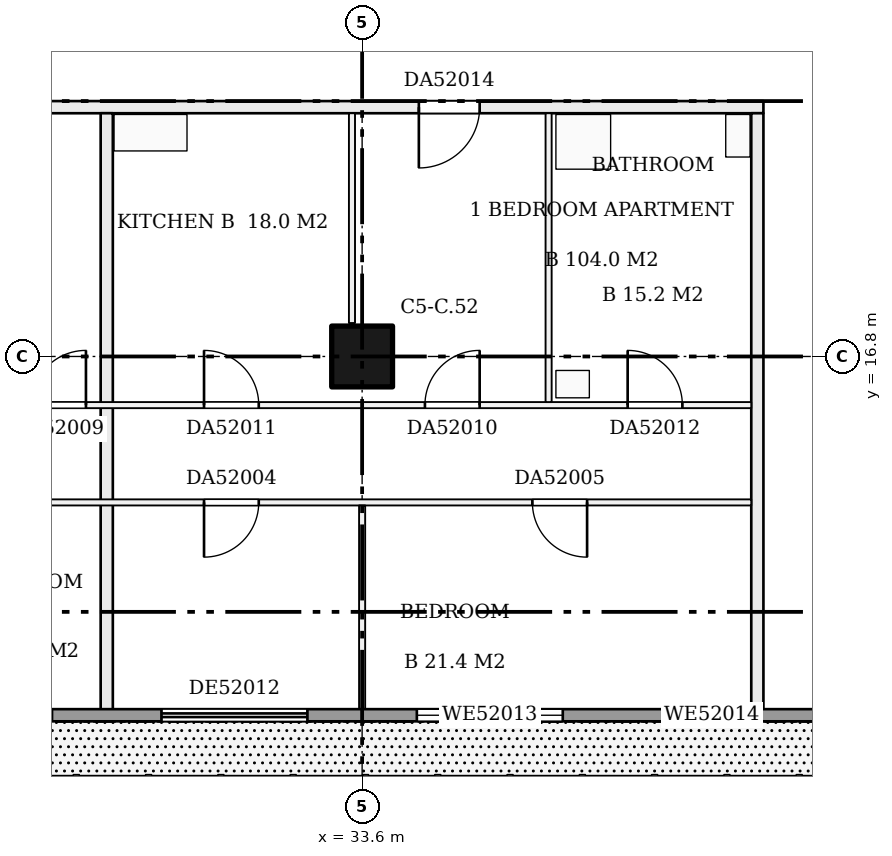
"""IFC4 building model, lengths in metres.
Left out: names, types, materials, properties, quantities, classifications, styles, units other than length and angle.
Written with IfcOpenShell. Run it as: python <this file> out.ifc"""

import sys

from ifc_helpers import new_model, si_unit, direction, frame, frame_2d, origin, origin_2d, place, context, subcontext, project, spatial, rectangle, extrude, element, fill, save


model = new_model("IFC4")
c1 = context("Model", 3, precision=1e-05, world=origin(), true_north=direction((0.0, 1.0)))
c2 = subcontext(c1, "Body", "Model", "MODEL_VIEW")
j1 = project(units=[si_unit("LENGTHUNIT", "METRE"), si_unit("PLANEANGLEUNIT", "RADIAN")], contexts=[c1])
p1 = place(None, origin())
s1 = spatial("IfcSite", under=j1, at=p1, CompositionType="ELEMENT")
p2 = place(p1, origin())
s2 = spatial("IfcBuilding", under=s1, at=p2, CompositionType="ELEMENT")
p3 = place(p2, frame((0.0, 0.0, 200.2)))
s3 = spatial("IfcBuildingStorey", under=s2, at=p3, CompositionType="ELEMENT", Elevation=200.2)
p4 = place(p3, frame((33.6, 16.8, 0.0), z_axis=(0.0, 0.0, 1.0), x_axis=(1.0, 0.0, 0.0)))
e1 = element("IfcColumn", 1, at=p4, inside=s3, PredefinedType="COLUMN", context=c2, shape_type="SweptSolid", body=[
    extrude(rectangle(XDim=1.0, YDim=1.0, at=origin_2d()), origin(), (0.0, 0.0, 1.0), 3.22),
])
p5 = place(p3, frame((21.1, 14.4, 0.0), z_axis=(0.0, 0.0, 1.0), x_axis=(1.0, 0.0, 0.0)))
e2 = element("IfcWall", 2, at=p5, inside=s3, PredefinedType="PARTITIONING", context=c2, shape_type="SweptSolid", body=[
    extrude(rectangle(XDim=18.9, YDim=0.1, at=frame_2d((9.45, 0.0))), origin(), (0.0, 0.0, 1.0), 3.22),
])
p6 = place(p5, frame((1.6, 0.0, 0.0)))
e3 = element("IfcOpeningElement", 3, at=p6, cuts=e2, PredefinedType="OPENING", context=c2, shape_type="SweptSolid", body=[
    extrude(rectangle(XDim=0.9, YDim=2.1, at=frame_2d((0.45, 1.05))), frame((0.0, 0.06, 0.0), z_axis=(0.0, -1.0, 0.0), x_axis=(1.0, 0.0, 0.0)), (0.0, 0.0, 1.0), 0.12),
])
p7 = place(p5, frame((5.7, 0.0, 0.0)))
e4 = element("IfcOpeningElement", 4, at=p7, cuts=e2, PredefinedType="OPENING", context=c2, shape_type="SweptSolid", body=[
    extrude(rectangle(XDim=0.9, YDim=2.1, at=frame_2d((0.45, 1.05))), frame((0.0, 0.06, 0.0), z_axis=(0.0, -1.0, 0.0), x_axis=(1.0, 0.0, 0.0)), (0.0, 0.0, 1.0), 0.12),
])
p8 = place(p5, frame((9.9, 0.0, 0.0)))
e5 = element("IfcOpeningElement", 5, at=p8, cuts=e2, PredefinedType="OPENING", context=c2, shape_type="SweptSolid", body=[
    extrude(rectangle(XDim=0.9, YDim=2.1, at=frame_2d((0.45, 1.05))), frame((0.0, 0.06, 0.0), z_axis=(0.0, -1.0, 0.0), x_axis=(1.0, 0.0, 0.0)), (0.0, 0.0, 1.0), 0.12),
])
p9 = place(p5, frame((15.3, 0.0, 0.0)))
e6 = element("IfcOpeningElement", 6, at=p9, cuts=e2, PredefinedType="OPENING", context=c2, shape_type="SweptSolid", body=[
    extrude(rectangle(XDim=0.9, YDim=2.1, at=frame_2d((0.45, 1.05))), frame((0.0, 0.06, 0.0), z_axis=(0.0, -1.0, 0.0), x_axis=(1.0, 0.0, 0.0)), (0.0, 0.0, 1.0), 0.12),
])
p10 = place(p3, frame((21.1, 16.0, 0.0), z_axis=(0.0, 0.0, 1.0), x_axis=(1.0, 0.0, 0.0)))
e7 = element("IfcWall", 7, at=p10, inside=s3, PredefinedType="PARTITIONING", context=c2, shape_type="SweptSolid", body=[
    extrude(rectangle(XDim=18.9, YDim=0.1, at=frame_2d((9.45, 0.0))), origin(), (0.0, 0.0, 1.0), 3.22),
])
p11 = place(p10, frame((5.274, 0.0, 0.0)))
e8 = element("IfcOpeningElement", 8, at=p11, cuts=e7, PredefinedType="OPENING", context=c2, shape_type="SweptSolid", body=[
    extrude(rectangle(XDim=0.9, YDim=2.1, at=frame_2d((0.45, 1.05))), frame((0.0, 0.06, 0.0), z_axis=(0.0, -1.0, 0.0), x_axis=(1.0, 0.0, 0.0)), (0.0, 0.0, 1.0), 0.12),
])
p12 = place(p10, frame((0.5, 0.0, 0.0)))
e9 = element("IfcOpeningElement", 9, at=p12, cuts=e7, PredefinedType="OPENING", context=c2, shape_type="SweptSolid", body=[
    extrude(rectangle(XDim=0.9, YDim=2.1, at=frame_2d((0.45, 1.05))), frame((0.0, 0.06, 0.0), z_axis=(0.0, -1.0, 0.0), x_axis=(1.0, 0.0, 0.0)), (0.0, 0.0, 1.0), 0.12),
])
p13 = place(p10, frame((2.49, 0.0, 0.0)))
e10 = element("IfcOpeningElement", 10, at=p13, cuts=e7, PredefinedType="OPENING", context=c2, shape_type="SweptSolid", body=[
    extrude(rectangle(XDim=0.9, YDim=2.1, at=frame_2d((0.45, 1.05))), frame((0.0, 0.06, 0.0), z_axis=(0.0, -1.0, 0.0), x_axis=(1.0, 0.0, 0.0)), (0.0, 0.0, 1.0), 0.12),
])
p14 = place(p10, frame((7.058, 0.0, 0.0)))
e11 = element("IfcOpeningElement", 11, at=p14, cuts=e7, PredefinedType="OPENING", context=c2, shape_type="SweptSolid", body=[
    extrude(rectangle(XDim=0.9, YDim=2.1, at=frame_2d((0.45, 1.05))), frame((0.0, 0.06, 0.0), z_axis=(0.0, -1.0, 0.0), x_axis=(1.0, 0.0, 0.0)), (0.0, 0.0, 1.0), 0.12),
])
p15 = place(p10, frame((13.533, 0.0, 0.0)))
e12 = element("IfcOpeningElement", 12, at=p15, cuts=e7, PredefinedType="OPENING", context=c2, shape_type="SweptSolid", body=[
    extrude(rectangle(XDim=0.9, YDim=2.1, at=frame_2d((0.45, 1.05))), frame((0.0, 0.06, 0.0), z_axis=(0.0, -1.0, 0.0), x_axis=(1.0, 0.0, 0.0)), (0.0, 0.0, 1.0), 0.12),
])
p16 = place(p10, frame((9.9, 0.0, 0.0)))
e13 = element("IfcOpeningElement", 13, at=p16, cuts=e7, PredefinedType="OPENING", context=c2, shape_type="SweptSolid", body=[
    extrude(rectangle(XDim=0.9, YDim=2.1, at=frame_2d((0.45, 1.05))), frame((0.0, 0.06, 0.0), z_axis=(0.0, -1.0, 0.0), x_axis=(1.0, 0.0, 0.0)), (0.0, 0.0, 1.0), 0.12),
])
p17 = place(p10, frame((16.867, 0.0, 0.0)))
e14 = element("IfcOpeningElement", 14, at=p17, cuts=e7, PredefinedType="OPENING", context=c2, shape_type="SweptSolid", body=[
    extrude(rectangle(XDim=0.9, YDim=2.1, at=frame_2d((0.45, 1.05))), frame((0.0, 0.06, 0.0), z_axis=(0.0, -1.0, 0.0), x_axis=(1.0, 0.0, 0.0)), (0.0, 0.0, 1.0), 0.12),
])
p18 = place(p3, frame((20.9, 20.9, 0.0), z_axis=(0.0, 0.0, 1.0), x_axis=(1.0, 0.0, 0.0)))
e15 = element("IfcWall", 15, at=p18, inside=s3, PredefinedType="PARTITIONING", context=c2, shape_type="SweptSolid", body=[
    extrude(rectangle(XDim=19.3, YDim=0.2, at=frame_2d((9.65, 0.0))), origin(), (0.0, 0.0, 1.0), 3.22),
])
p19 = place(p18, frame((5.374, 0.0, 0.0)))
e16 = element("IfcOpeningElement", 16, at=p19, cuts=e15, PredefinedType="OPENING", context=c2, shape_type="SweptSolid", body=[
    extrude(rectangle(XDim=1.0, YDim=2.1, at=frame_2d((0.5, 1.05))), frame((0.0, 0.11, 0.0), z_axis=(0.0, -1.0, 0.0), x_axis=(1.0, 0.0, 0.0)), (0.0, 0.0, 1.0), 0.22),
])
p20 = place(p18, frame((13.633, 0.0, 0.0)))
e17 = element("IfcOpeningElement", 17, at=p20, cuts=e15, PredefinedType="OPENING", context=c2, shape_type="SweptSolid", body=[
    extrude(rectangle(XDim=1.0, YDim=2.1, at=frame_2d((0.5, 1.05))), frame((0.0, 0.11, 0.0), z_axis=(0.0, -1.0, 0.0), x_axis=(1.0, 0.0, 0.0)), (0.0, 0.0, 1.0), 0.22),
])
p21 = place(p3, frame((29.4, 10.9, 0.0), z_axis=(0.0, 0.0, 1.0), x_axis=(0.0, 1.0, 0.0)))
e18 = element("IfcWall", 18, at=p21, inside=s3, PredefinedType="PARTITIONING", context=c2, shape_type="SweptSolid", body=[
    extrude(rectangle(XDim=9.9, YDim=0.2, at=frame_2d((4.95, 0.0))), origin(), (0.0, 0.0, 1.0), 3.22),
])
p22 = place(p3, frame((33.433, 17.35, 0.0), z_axis=(0.0, 0.0, 1.0), x_axis=(0.0, 1.0, 0.0)))
e19 = element("IfcWall", 19, at=p22, inside=s3, PredefinedType="PARTITIONING", context=c2, shape_type="SweptSolid", body=[
    extrude(rectangle(XDim=3.45, YDim=0.1, at=frame_2d((1.725, 0.0))), origin(), (0.0, 0.0, 1.0), 3.22),
])
p23 = place(p3, frame((33.6, 10.9, 0.0), z_axis=(0.0, 0.0, 1.0), x_axis=(0.0, 1.0, 0.0)))
e20 = element("IfcWall", 20, at=p23, inside=s3, PredefinedType="PARTITIONING", context=c2, shape_type="SweptSolid", body=[
    extrude(rectangle(XDim=3.45, YDim=0.1, at=frame_2d((1.725, 0.0))), origin(), (0.0, 0.0, 1.0), 3.22),
])
p24 = place(p3, frame((36.667, 16.05, 0.0), z_axis=(0.0, 0.0, 1.0), x_axis=(0.0, 1.0, 0.0)))
e21 = element("IfcWall", 21, at=p24, inside=s3, PredefinedType="PARTITIONING", context=c2, shape_type="SweptSolid", body=[
    extrude(rectangle(XDim=4.75, YDim=0.1, at=frame_2d((2.375, 0.0))), origin(), (0.0, 0.0, 1.0), 3.22),
])
p25 = place(p3, frame((40.1, 10.9, 0.0), z_axis=(0.0, 0.0, 1.0), x_axis=(0.0, 1.0, 0.0)))
e22 = element("IfcWall", 22, at=p25, inside=s3, PredefinedType="PARTITIONING", context=c2, shape_type="SweptSolid", body=[
    extrude(rectangle(XDim=9.9, YDim=0.2, at=frame_2d((4.95, 0.0))), origin(), (0.0, 0.0, 1.0), 3.22),
])
p26 = place(p3, frame((13.2, 10.9, 0.0), z_axis=(0.0, 0.0, 1.0), x_axis=(1.0, 0.0, 0.0)))
e23 = element("IfcWall", 23, at=p26, inside=s3, PredefinedType="SOLIDWALL", context=c2, shape_type="SweptSolid", body=[
    extrude(rectangle(XDim=28.8, YDim=0.2, at=frame_2d((14.4, 0.0))), origin(), (0.0, 0.0, 1.0), 3.22),
])
p27 = place(p26, frame((0.3, 0.0, 0.0)))
e24 = element("IfcOpeningElement", 24, at=p27, cuts=e23, PredefinedType="OPENING", context=c2, shape_type="SweptSolid", body=[
    extrude(rectangle(XDim=2.4, YDim=2.2, at=frame_2d((1.2, 1.1))), frame((0.0, 0.11, 0.0), z_axis=(0.0, -1.0, 0.0), x_axis=(1.0, 0.0, 0.0)), (0.0, 0.0, 1.0), 0.22),
])
p28 = place(p26, frame((4.5, 0.0, 0.0)))
e25 = element("IfcOpeningElement", 25, at=p28, cuts=e23, PredefinedType="OPENING", context=c2, shape_type="SweptSolid", body=[
    extrude(rectangle(XDim=2.4, YDim=2.2, at=frame_2d((1.2, 1.1))), frame((0.0, 0.11, 0.0), z_axis=(0.0, -1.0, 0.0), x_axis=(1.0, 0.0, 0.0)), (0.0, 0.0, 1.0), 0.22),
])
p29 = place(p26, frame((8.7, 0.0, 0.9)))
e26 = element("IfcOpeningElement", 26, at=p29, cuts=e23, PredefinedType="OPENING", context=c2, shape_type="SweptSolid", body=[
    extrude(rectangle(XDim=2.4, YDim=1.5, at=frame_2d((1.2, 0.75))), frame((0.0, 0.11, 0.0), z_axis=(0.0, -1.0, 0.0), x_axis=(1.0, 0.0, 0.0)), (0.0, 0.0, 1.0), 0.22),
])
p30 = place(p26, frame((12.9, 0.0, 0.9)))
e27 = element("IfcOpeningElement", 27, at=p30, cuts=e23, PredefinedType="OPENING", context=c2, shape_type="SweptSolid", body=[
    extrude(rectangle(XDim=2.4, YDim=1.5, at=frame_2d((1.2, 0.75))), frame((0.0, 0.11, 0.0), z_axis=(0.0, -1.0, 0.0), x_axis=(1.0, 0.0, 0.0)), (0.0, 0.0, 1.0), 0.22),
])
p31 = place(p26, frame((17.1, 0.0, 0.0)))
e28 = element("IfcOpeningElement", 28, at=p31, cuts=e23, PredefinedType="OPENING", context=c2, shape_type="SweptSolid", body=[
    extrude(rectangle(XDim=2.4, YDim=2.2, at=frame_2d((1.2, 1.1))), frame((0.0, 0.11, 0.0), z_axis=(0.0, -1.0, 0.0), x_axis=(1.0, 0.0, 0.0)), (0.0, 0.0, 1.0), 0.22),
])
p32 = place(p26, frame((21.3, 0.0, 0.9)))
e29 = element("IfcOpeningElement", 29, at=p32, cuts=e23, PredefinedType="OPENING", context=c2, shape_type="SweptSolid", body=[
    extrude(rectangle(XDim=2.4, YDim=1.5, at=frame_2d((1.2, 0.75))), frame((0.0, 0.11, 0.0), z_axis=(0.0, -1.0, 0.0), x_axis=(1.0, 0.0, 0.0)), (0.0, 0.0, 1.0), 0.22),
])
p33 = place(p26, frame((25.5, 0.0, 0.9)))
e30 = element("IfcOpeningElement", 30, at=p33, cuts=e23, PredefinedType="OPENING", context=c2, shape_type="SweptSolid", body=[
    extrude(rectangle(XDim=1.3, YDim=1.5, at=frame_2d((0.65, 0.75))), frame((0.0, 0.11, 0.0), z_axis=(0.0, -1.0, 0.0), x_axis=(1.0, 0.0, 0.0)), (0.0, 0.0, 1.0), 0.22),
])
p34 = place(p8, frame((0.9, 0.0, 0.0), z_axis=(0.0, 0.0, 1.0), x_axis=(-1.0, 0.0, 0.0)))
e31 = element("IfcDoor", 31, at=p34, inside=s3, OperationType="SINGLE_SWING_RIGHT", PredefinedType="DOOR", context=c2, shape_type="SweptSolid", body=[
    extrude(rectangle(XDim=0.9, YDim=2.1, at=frame_2d((0.45, 1.05))), frame((0.0, 0.025, 0.0), z_axis=(0.0, -1.0, 0.0), x_axis=(1.0, 0.0, 0.0)), (0.0, 0.0, 1.0), 0.05),
])
fill(e5, e31)
p35 = place(p9, frame((0.9, 0.0, 0.0), z_axis=(0.0, 0.0, 1.0), x_axis=(-1.0, 0.0, 0.0)))
e32 = element("IfcDoor", 32, at=p35, inside=s3, OperationType="SINGLE_SWING_LEFT", PredefinedType="DOOR", context=c2, shape_type="SweptSolid", body=[
    extrude(rectangle(XDim=0.9, YDim=2.1, at=frame_2d((0.45, 1.05))), frame((0.0, 0.025, 0.0), z_axis=(0.0, -1.0, 0.0), x_axis=(1.0, 0.0, 0.0)), (0.0, 0.0, 1.0), 0.05),
])
fill(e6, e32)
p36 = place(p14, origin())
e33 = element("IfcDoor", 33, at=p36, inside=s3, OperationType="SINGLE_SWING_RIGHT", PredefinedType="DOOR", context=c2, shape_type="SweptSolid", body=[
    extrude(rectangle(XDim=0.9, YDim=2.1, at=frame_2d((0.45, 1.05))), frame((0.0, 0.025, 0.0), z_axis=(0.0, -1.0, 0.0), x_axis=(1.0, 0.0, 0.0)), (0.0, 0.0, 1.0), 0.05),
])
fill(e11, e33)
p37 = place(p15, origin())
e34 = element("IfcDoor", 34, at=p37, inside=s3, OperationType="SINGLE_SWING_RIGHT", PredefinedType="DOOR", context=c2, shape_type="SweptSolid", body=[
    extrude(rectangle(XDim=0.9, YDim=2.1, at=frame_2d((0.45, 1.05))), frame((0.0, 0.025, 0.0), z_axis=(0.0, -1.0, 0.0), x_axis=(1.0, 0.0, 0.0)), (0.0, 0.0, 1.0), 0.05),
])
fill(e12, e34)
p38 = place(p16, origin())
e35 = element("IfcDoor", 35, at=p38, inside=s3, OperationType="SINGLE_SWING_LEFT", PredefinedType="DOOR", context=c2, shape_type="SweptSolid", body=[
    extrude(rectangle(XDim=0.9, YDim=2.1, at=frame_2d((0.45, 1.05))), frame((0.0, 0.025, 0.0), z_axis=(0.0, -1.0, 0.0), x_axis=(1.0, 0.0, 0.0)), (0.0, 0.0, 1.0), 0.05),
])
fill(e13, e35)
p39 = place(p17, origin())
e36 = element("IfcDoor", 36, at=p39, inside=s3, OperationType="SINGLE_SWING_LEFT", PredefinedType="DOOR", context=c2, shape_type="SweptSolid", body=[
    extrude(rectangle(XDim=0.9, YDim=2.1, at=frame_2d((0.45, 1.05))), frame((0.0, 0.025, 0.0), z_axis=(0.0, -1.0, 0.0), x_axis=(1.0, 0.0, 0.0)), (0.0, 0.0, 1.0), 0.05),
])
fill(e14, e36)
p40 = place(p20, frame((1.0, 0.0, 0.0), z_axis=(0.0, 0.0, 1.0), x_axis=(-1.0, 0.0, 0.0)))
e37 = element("IfcDoor", 37, at=p40, inside=s3, OperationType="SINGLE_SWING_RIGHT", PredefinedType="DOOR", context=c2, shape_type="SweptSolid", body=[
    extrude(rectangle(XDim=1.0, YDim=2.1, at=frame_2d((0.5, 1.05))), frame((0.0, 0.025, 0.0), z_axis=(0.0, -1.0, 0.0), x_axis=(1.0, 0.0, 0.0)), (0.0, 0.0, 1.0), 0.05),
])
fill(e17, e37)
p41 = place(p31, origin())
e38 = element("IfcDoor", 38, at=p41, inside=s3, OperationType="DOUBLE_DOOR_SLIDING", PredefinedType="DOOR", context=c2, shape_type="SweptSolid", body=[
    extrude(rectangle(XDim=2.4, YDim=2.2, at=frame_2d((1.2, 1.1))), frame((0.0, 0.025, 0.0), z_axis=(0.0, -1.0, 0.0), x_axis=(1.0, 0.0, 0.0)), (0.0, 0.0, 1.0), 0.05),
])
fill(e28, e38)
p42 = place(p32, origin())
e39 = element("IfcWindow", 39, at=p42, inside=s3, PartitioningType="SINGLE_PANEL", PredefinedType="WINDOW", context=c2, shape_type="SweptSolid", body=[
    extrude(rectangle(XDim=2.4, YDim=1.5, at=frame_2d((1.2, 0.75))), frame((0.0, 0.03, 0.0), z_axis=(0.0, -1.0, 0.0), x_axis=(1.0, 0.0, 0.0)), (0.0, 0.0, 1.0), 0.06),
])
fill(e29, e39)
p43 = place(p33, origin())
e40 = element("IfcWindow", 40, at=p43, inside=s3, PartitioningType="SINGLE_PANEL", PredefinedType="WINDOW", context=c2, shape_type="SweptSolid", body=[
    extrude(rectangle(XDim=1.3, YDim=1.5, at=frame_2d((0.65, 0.75))), frame((0.0, 0.03, 0.0), z_axis=(0.0, -1.0, 0.0), x_axis=(1.0, 0.0, 0.0)), (0.0, 0.0, 1.0), 0.06),
])
fill(e30, e40)
save(model, sys.argv[1])
